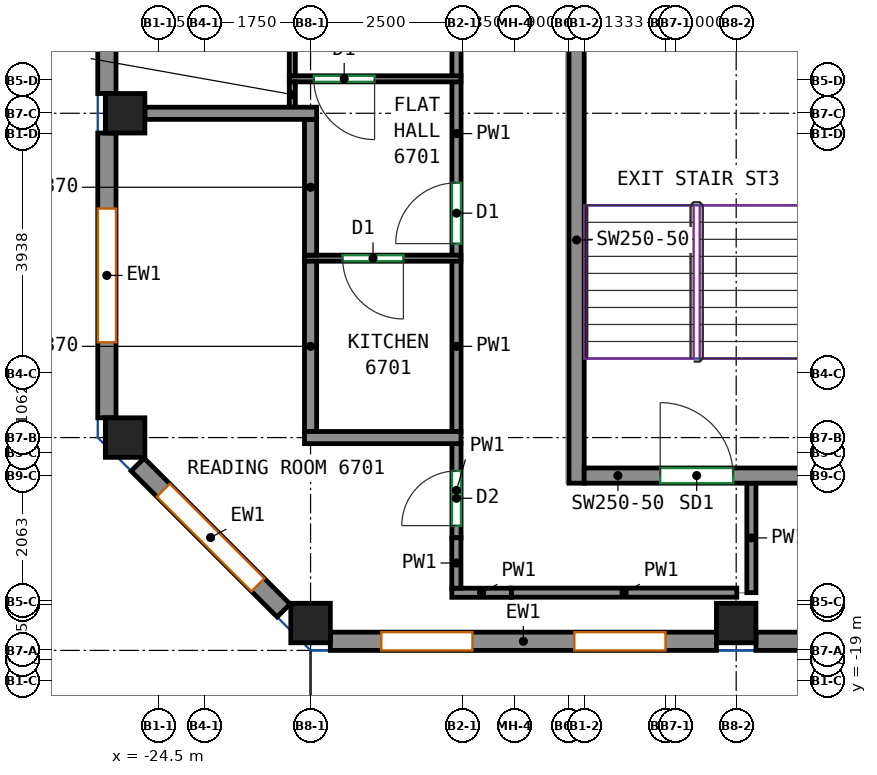
"""IFC4 building model, lengths in metres.
Left out: names, types, materials, properties, quantities, classifications, styles, units other than length and angle.
Written with IfcOpenShell. Run it as: python <this file> out.ifc"""

import sys

from ifc_helpers import new_model, si_unit, direction, frame, frame_2d, origin, origin_2d, place, context, subcontext, project, spatial, rectangle, extrude, source, transform, mapped, element, fill, save


model = new_model("IFC4")
c1 = context("Model", 3, precision=1e-05, world=origin(), true_north=direction((0.0, 1.0)))
c2 = subcontext(c1, "Body", "Model", "MODEL_VIEW")
j1 = project(units=[si_unit("LENGTHUNIT", "METRE"), si_unit("PLANEANGLEUNIT", "RADIAN")], contexts=[c1])
p1 = place(None, origin())
s1 = spatial("IfcSite", under=j1, at=p1, CompositionType="ELEMENT")
p2 = place(p1, origin())
s2 = spatial("IfcBuilding", under=s1, at=p2, CompositionType="ELEMENT")
p3 = place(p2, frame((0.0, 0.0, 273.8)))
s3 = spatial("IfcBuildingStorey", under=s2, at=p3, CompositionType="ELEMENT", Elevation=273.8)
m1 = source(origin(), c2, "Body", "SweptSolid", [
    extrude(rectangle(XDim=0.65, YDim=0.65, at=origin_2d()), origin(), (0.0, 0.0, 1.0), 3.12),
])
for number, where, z_axis, x_axis in (
    (1, (-25.05, -15.0, 0.0), (0.0, 0.0, 1.0), (1.0, 0.0, 0.0)),
    (2, (-25.05, -9.667, 0.0), (0.0, 0.0, 1.0), (1.0, 0.0, 0.0)),
    (3, (-22.0, -18.05, 0.0), (0.0, 0.0, 1.0), (1.0, 0.0, 0.0)),
    (4, (-15.0, -18.05, 0.0), (0.0, 0.0, 1.0), (1.0, 0.0, 0.0)),
):
    element("IfcColumn", number, at=place(p3, frame(where, z_axis=z_axis, x_axis=x_axis)), inside=s3, PredefinedType="COLUMN", context=c2, shape_type="MappedRepresentation", body=[
        mapped(m1, transform((0.0, 0.0, 0.0))),
    ])
m2 = source(origin(), c2, "Body", "SweptSolid", [
    extrude(rectangle(XDim=8.0, YDim=0.25, at=frame_2d((4.0, 0.0))), origin(), (0.0, 0.0, 1.0), 3.12),
])
p4 = place(p3, frame((-17.625, -15.75, 0.0), z_axis=(0.0, 0.0, 1.0), x_axis=(0.0, 1.0, 0.0)))
e5 = element("IfcWall", 5, at=p4, inside=s3, PredefinedType="SHEAR", context=c2, shape_type="MappedRepresentation", body=[
    mapped(m2, transform((0.0, 0.0, 0.0))),
])
m3 = source(origin(), c2, "Body", "SweptSolid", [
    extrude(rectangle(XDim=3.7, YDim=0.25, at=frame_2d((1.85, 0.0))), origin(), (0.0, 0.0, 1.0), 3.12),
])
p5 = place(p3, frame((-17.5, -15.625, 0.0), z_axis=(0.0, 0.0, 1.0), x_axis=(1.0, 0.0, 0.0)))
e6 = element("IfcWall", 6, at=p5, inside=s3, PredefinedType="SHEAR", context=c2, shape_type="MappedRepresentation", body=[
    mapped(m3, transform((0.0, 0.0, 0.0))),
])
p6 = place(p5, frame((1.25, 0.0, 0.0)))
e7 = element("IfcOpeningElement", 7, at=p6, cuts=e6, PredefinedType="OPENING", context=c2, shape_type="SweptSolid", body=[
    extrude(rectangle(XDim=1.2, YDim=2.1, at=frame_2d((0.6, 1.05))), frame((0.0, 0.135, 0.0), z_axis=(0.0, -1.0, 0.0), x_axis=(1.0, 0.0, 0.0)), (0.0, 0.0, 1.0), 0.27),
])
m4 = source(origin(), c2, "Body", "SweptSolid", [
    extrude(rectangle(XDim=6.35, YDim=0.3, at=frame_2d((3.175, 0.0))), origin(), (0.0, 0.0, 1.0), 3.12),
])
p7 = place(p3, frame((-21.675, -18.35, 0.0), z_axis=(0.0, 0.0, 1.0), x_axis=(1.0, 0.0, 0.0)))
e8 = element("IfcWall", 8, at=p7, inside=s3, PredefinedType="SOLIDWALL", context=c2, shape_type="MappedRepresentation", body=[
    mapped(m4, transform((0.0, 0.0, 0.0))),
])
p8 = place(p7, frame((0.837, 0.0, 0.8)))
e9 = element("IfcOpeningElement", 9, at=p8, cuts=e8, PredefinedType="OPENING", context=c2, shape_type="SweptSolid", body=[
    extrude(rectangle(XDim=1.5, YDim=2.05, at=frame_2d((0.75, 1.025))), frame((0.0, 0.16, 0.0), z_axis=(0.0, -1.0, 0.0), x_axis=(1.0, 0.0, 0.0)), (0.0, 0.0, 1.0), 0.32),
])
p9 = place(p7, frame((4.012, 0.0, 0.8)))
e10 = element("IfcOpeningElement", 10, at=p9, cuts=e8, PredefinedType="OPENING", context=c2, shape_type="SweptSolid", body=[
    extrude(rectangle(XDim=1.5, YDim=2.05, at=frame_2d((0.75, 1.025))), frame((0.0, 0.16, 0.0), z_axis=(0.0, -1.0, 0.0), x_axis=(1.0, 0.0, 0.0)), (0.0, 0.0, 1.0), 0.32),
])
p10 = place(p3, frame((-14.675, -18.35, 0.0), z_axis=(0.0, 0.0, 1.0), x_axis=(1.0, 0.0, 0.0)))
e11 = element("IfcWall", 11, at=p10, inside=s3, PredefinedType="SOLIDWALL", context=c2, shape_type="MappedRepresentation", body=[
    mapped(m4, transform((0.0, 0.0, 0.0))),
])
p11 = place(p10, frame((0.837, 0.0, 0.8)))
e12 = element("IfcOpeningElement", 12, at=p11, cuts=e11, PredefinedType="OPENING", context=c2, shape_type="SweptSolid", body=[
    extrude(rectangle(XDim=1.5, YDim=2.05, at=frame_2d((0.75, 1.025))), frame((0.0, 0.16, 0.0), z_axis=(0.0, -1.0, 0.0), x_axis=(1.0, 0.0, 0.0)), (0.0, 0.0, 1.0), 0.32),
])
p12 = place(p10, frame((4.012, 0.0, 0.8)))
e13 = element("IfcOpeningElement", 13, at=p12, cuts=e11, PredefinedType="OPENING", context=c2, shape_type="SweptSolid", body=[
    extrude(rectangle(XDim=1.5, YDim=2.05, at=frame_2d((0.75, 1.025))), frame((0.0, 0.16, 0.0), z_axis=(0.0, -1.0, 0.0), x_axis=(1.0, 0.0, 0.0)), (0.0, 0.0, 1.0), 0.32),
])
m5 = source(origin(), c2, "Body", "SweptSolid", [
    extrude(rectangle(XDim=8.184, YDim=0.3, at=frame_2d((4.092, 0.0))), origin(), (0.0, 0.0, 1.0), 3.12),
])
p13 = place(p3, frame((-25.35, -1.158, 0.0), z_axis=(0.0, 0.0, 1.0), x_axis=(0.0, -1.0, 0.0)))
e14 = element("IfcWall", 14, at=p13, inside=s3, PredefinedType="SOLIDWALL", context=c2, shape_type="MappedRepresentation", body=[
    mapped(m5, transform((0.0, 0.0, 0.0))),
])
p14 = place(p13, frame((0.946, 0.0, 0.8)))
e15 = element("IfcOpeningElement", 15, at=p14, cuts=e14, PredefinedType="OPENING", context=c2, shape_type="SweptSolid", body=[
    extrude(rectangle(XDim=2.2, YDim=2.05, at=frame_2d((1.1, 1.025))), frame((0.0, 0.16, 0.0), z_axis=(0.0, -1.0, 0.0), x_axis=(1.0, 0.0, 0.0)), (0.0, 0.0, 1.0), 0.32),
])
p15 = place(p13, frame((5.038, 0.0, 0.8)))
e16 = element("IfcOpeningElement", 16, at=p15, cuts=e14, PredefinedType="OPENING", context=c2, shape_type="SweptSolid", body=[
    extrude(rectangle(XDim=2.2, YDim=2.05, at=frame_2d((1.1, 1.025))), frame((0.0, 0.16, 0.0), z_axis=(0.0, -1.0, 0.0), x_axis=(1.0, 0.0, 0.0)), (0.0, 0.0, 1.0), 0.32),
])
m6 = source(origin(), c2, "Body", "SweptSolid", [
    extrude(rectangle(XDim=4.683, YDim=0.3, at=frame_2d((2.342, 0.0))), origin(), (0.0, 0.0, 1.0), 3.12),
])
p16 = place(p3, frame((-25.35, -9.992, 0.0), z_axis=(0.0, 0.0, 1.0), x_axis=(0.0, -1.0, 0.0)))
e17 = element("IfcWall", 17, at=p16, inside=s3, PredefinedType="SOLIDWALL", context=c2, shape_type="MappedRepresentation", body=[
    mapped(m6, transform((0.0, 0.0, 0.0))),
])
p17 = place(p16, frame((1.242, 0.0, 0.8)))
e18 = element("IfcOpeningElement", 18, at=p17, cuts=e17, PredefinedType="OPENING", context=c2, shape_type="SweptSolid", body=[
    extrude(rectangle(XDim=2.2, YDim=2.05, at=frame_2d((1.1, 1.025))), frame((0.0, 0.16, 0.0), z_axis=(0.0, -1.0, 0.0), x_axis=(1.0, 0.0, 0.0)), (0.0, 0.0, 1.0), 0.32),
])
m7 = source(origin(), c2, "Body", "SweptSolid", [
    extrude(rectangle(XDim=3.394, YDim=0.3, at=frame_2d((1.697, 0.0))), origin(), (0.0, 0.0, 1.0), 3.12),
])
p18 = place(p3, frame((-24.844, -15.444, 0.0), z_axis=(0.0, 0.0, 1.0), x_axis=(0.707070815327, -0.707142745217, 0.0)))
e19 = element("IfcWall", 19, at=p18, inside=s3, PredefinedType="SOLIDWALL", context=c2, shape_type="MappedRepresentation", body=[
    mapped(m7, transform((0.0, 0.0, 0.0))),
])
p19 = place(p18, frame((0.597, 0.0, 0.8)))
e20 = element("IfcOpeningElement", 20, at=p19, cuts=e19, PredefinedType="OPENING", context=c2, shape_type="SweptSolid", body=[
    extrude(rectangle(XDim=2.2, YDim=2.05, at=frame_2d((1.1, 1.025))), frame((0.0, 0.16, 0.0), z_axis=(0.0, -1.0, 0.0), x_axis=(1.0, 0.0, 0.0)), (0.0, 0.0, 1.0), 0.32),
])
p20 = place(p3, frame((-19.6, -14.91, 0.0), z_axis=(0.0, 0.0, 1.0), x_axis=(0.0, 1.0, 0.0)))
e21 = element("IfcWall", 21, at=p20, inside=s3, PredefinedType="PARTITIONING", context=c2, shape_type="SweptSolid", body=[
    extrude(rectangle(XDim=2.82, YDim=0.15, at=frame_2d((1.41, 0.0))), origin(), (0.0, 0.0, 1.0), 3.12),
])
p21 = place(p3, frame((-19.6, -12.01, 0.0), z_axis=(0.0, 0.0, 1.0), x_axis=(0.0, 1.0, 0.0)))
e22 = element("IfcWall", 22, at=p21, inside=s3, PredefinedType="PARTITIONING", context=c2, shape_type="SweptSolid", body=[
    extrude(rectangle(XDim=2.87, YDim=0.15, at=frame_2d((1.435, 0.0))), origin(), (0.0, 0.0, 1.0), 3.12),
])
p22 = place(p21, frame((0.2, 0.0, 0.0)))
e23 = element("IfcOpeningElement", 23, at=p22, cuts=e22, PredefinedType="OPENING", context=c2, shape_type="SweptSolid", body=[
    extrude(rectangle(XDim=1.0, YDim=2.1, at=frame_2d((0.5, 1.05))), frame((0.0, 0.085, 0.0), z_axis=(0.0, -1.0, 0.0), x_axis=(1.0, 0.0, 0.0)), (0.0, 0.0, 1.0), 0.17),
])
p23 = place(p3, frame((-19.6, -9.06, 0.0), z_axis=(0.0, 0.0, 1.0), x_axis=(0.0, 1.0, 0.0)))
e24 = element("IfcWall", 24, at=p23, inside=s3, PredefinedType="PARTITIONING", context=c2, shape_type="SweptSolid", body=[
    extrude(rectangle(XDim=1.608, YDim=0.15, at=frame_2d((0.804, 0.0))), origin(), (0.0, 0.0, 1.0), 3.12),
])
p24 = place(p3, frame((-14.75, -17.55, 0.0), z_axis=(0.0, 0.0, 1.0), x_axis=(0.0, 1.0, 0.0)))
e25 = element("IfcWall", 25, at=p24, inside=s3, PredefinedType="PARTITIONING", context=c2, shape_type="SweptSolid", body=[
    extrude(rectangle(XDim=1.8, YDim=0.15, at=frame_2d((0.9, 0.0))), origin(), (0.0, 0.0, 1.0), 3.12),
])
p25 = place(p3, frame((-19.6, -16.648, 0.0), z_axis=(0.0, 0.0, 1.0), x_axis=(0.0, 1.0, 0.0)))
e26 = element("IfcWall", 26, at=p25, inside=s3, PredefinedType="PARTITIONING", context=c2, shape_type="SweptSolid", body=[
    extrude(rectangle(XDim=1.558, YDim=0.15, at=frame_2d((0.779, 0.0))), origin(), (0.0, 0.0, 1.0), 3.12),
])
p26 = place(p25, frame((0.2, 0.0, 0.0)))
e27 = element("IfcOpeningElement", 27, at=p26, cuts=e26, PredefinedType="OPENING", context=c2, shape_type="SweptSolid", body=[
    extrude(rectangle(XDim=0.9, YDim=2.1, at=frame_2d((0.45, 1.05))), frame((0.0, 0.085, 0.0), z_axis=(0.0, -1.0, 0.0), x_axis=(1.0, 0.0, 0.0)), (0.0, 0.0, 1.0), 0.17),
])
p27 = place(p3, frame((-18.698, -17.55, 0.0), z_axis=(0.0, 0.0, 1.0), x_axis=(1.0, 0.0, 0.0)))
e28 = element("IfcWall", 28, at=p27, inside=s3, PredefinedType="PARTITIONING", context=c2, shape_type="SweptSolid", body=[
    extrude(rectangle(XDim=3.708, YDim=0.15, at=frame_2d((1.854, 0.0))), origin(), (0.0, 0.0, 1.0), 3.12),
])
p28 = place(p3, frame((-19.677, -17.552, 0.0), z_axis=(0.0, 0.0, 1.0), x_axis=(1.0, 0.0, 0.0)))
e29 = element("IfcWall", 29, at=p28, inside=s3, PredefinedType="PARTITIONING", context=c2, shape_type="SweptSolid", body=[
    extrude(rectangle(XDim=0.979, YDim=0.15, at=frame_2d((0.49, 0.0))), origin(), (0.0, 0.0, 1.0), 3.12),
])
p29 = place(p3, frame((-19.602, -17.477, 0.0), z_axis=(0.0, 0.0, 1.0), x_axis=(0.0, 1.0, 0.0)))
e30 = element("IfcWall", 30, at=p29, inside=s3, PredefinedType="PARTITIONING", context=c2, shape_type="SweptSolid", body=[
    extrude(rectangle(XDim=0.829, YDim=0.15, at=frame_2d((0.415, 0.0))), origin(), (0.0, 0.0, 1.0), 3.12),
])
p30 = place(p3, frame((-19.527, -12.05, 0.0), z_axis=(0.0, 0.0, 1.0), x_axis=(-1.0, 0.0, 0.0)))
e31 = element("IfcWall", 31, at=p30, inside=s3, PredefinedType="PARTITIONING", context=c2, shape_type="SweptSolid", body=[
    extrude(rectangle(XDim=2.573, YDim=0.1, at=frame_2d((1.287, 0.0))), origin(), (0.0, 0.0, 1.0), 3.12),
])
p31 = place(p30, frame((0.946, 0.0, 0.0)))
e32 = element("IfcOpeningElement", 32, at=p31, cuts=e31, PredefinedType="OPENING", context=c2, shape_type="SweptSolid", body=[
    extrude(rectangle(XDim=1.0, YDim=2.1, at=frame_2d((0.5, 1.05))), frame((0.0, 0.06, 0.0), z_axis=(0.0, -1.0, 0.0), x_axis=(1.0, 0.0, 0.0)), (0.0, 0.0, 1.0), 0.12),
])
p32 = place(p3, frame((-22.0, -14.9, 0.0), z_axis=(0.0, 0.0, 1.0), x_axis=(0.0, 1.0, 0.0)))
e33 = element("IfcWall", 33, at=p32, inside=s3, PredefinedType="PARTITIONING", context=c2, shape_type="SweptSolid", body=[
    extrude(rectangle(XDim=2.8, YDim=0.2, at=frame_2d((1.4, 0.0))), origin(), (0.0, 0.0, 1.0), 2.57),
])
p33 = place(p3, frame((-22.1, -15.0, 0.0), z_axis=(0.0, 0.0, 1.0), x_axis=(1.0, 0.0, 0.0)))
e34 = element("IfcWall", 34, at=p33, inside=s3, PredefinedType="PARTITIONING", context=c2, shape_type="SweptSolid", body=[
    extrude(rectangle(XDim=2.573, YDim=0.2, at=frame_2d((1.287, 0.0))), origin(), (0.0, 0.0, 1.0), 3.12),
])
p34 = place(p3, frame((-19.527, -9.1, 0.0), z_axis=(0.0, 0.0, 1.0), x_axis=(-1.0, 0.0, 0.0)))
e35 = element("IfcWall", 35, at=p34, inside=s3, PredefinedType="PARTITIONING", context=c2, shape_type="SweptSolid", body=[
    extrude(rectangle(XDim=2.823, YDim=0.1, at=frame_2d((1.412, 0.0))), origin(), (0.0, 0.0, 1.0), 3.12),
])
p35 = place(p34, frame((1.42, 0.0, 0.0)))
e36 = element("IfcOpeningElement", 36, at=p35, cuts=e35, PredefinedType="OPENING", context=c2, shape_type="SweptSolid", body=[
    extrude(rectangle(XDim=1.0, YDim=2.1, at=frame_2d((0.5, 1.05))), frame((0.0, 0.06, 0.0), z_axis=(0.0, -1.0, 0.0), x_axis=(1.0, 0.0, 0.0)), (0.0, 0.0, 1.0), 0.12),
])
p36 = place(p3, frame((-22.3, -9.567, 0.0), z_axis=(0.0, 0.0, 1.0), x_axis=(0.0, 1.0, 0.0)))
e37 = element("IfcWall", 37, at=p36, inside=s3, PredefinedType="PARTITIONING", context=c2, shape_type="SweptSolid", body=[
    extrude(rectangle(XDim=0.417, YDim=0.1, at=frame_2d((0.208, 0.0))), origin(), (0.0, 0.0, 1.0), 2.57),
])
p37 = place(p3, frame((-22.0, -12.0, 0.0), z_axis=(0.0, 0.0, 1.0), x_axis=(0.0, 1.0, 0.0)))
e38 = element("IfcWall", 38, at=p37, inside=s3, PredefinedType="PARTITIONING", context=c2, shape_type="SweptSolid", body=[
    extrude(rectangle(XDim=2.233, YDim=0.2, at=frame_2d((1.116, 0.0))), origin(), (0.0, 0.0, 1.0), 2.57),
])
p38 = place(p3, frame((-22.3, -9.05, 0.0), z_axis=(0.0, 0.0, 1.0), x_axis=(0.0, 1.0, 0.0)))
e39 = element("IfcWall", 39, at=p38, inside=s3, PredefinedType="PARTITIONING", context=c2, shape_type="SweptSolid", body=[
    extrude(rectangle(XDim=2.85, YDim=0.1, at=frame_2d((1.425, 0.0))), origin(), (0.0, 0.0, 1.0), 2.57),
])
p39 = place(p3, frame((-24.725, -9.667, 0.0), z_axis=(0.0, 0.0, 1.0), x_axis=(1.0, 0.0, 0.0)))
e40 = element("IfcWall", 40, at=p39, inside=s3, PredefinedType="PARTITIONING", context=c2, shape_type="SweptSolid", body=[
    extrude(rectangle(XDim=2.825, YDim=0.2, at=frame_2d((1.413, 0.0))), origin(), (0.0, 0.0, 1.0), 3.12),
])
p40 = place(p8, origin())
e41 = element("IfcWindow", 41, at=p40, inside=s3, PartitioningType="SINGLE_PANEL", PredefinedType="WINDOW", context=c2, shape_type="SweptSolid", body=[
    extrude(rectangle(XDim=1.5, YDim=2.05, at=frame_2d((0.75, 1.025))), frame((0.0, 0.03, 0.0), z_axis=(0.0, -1.0, 0.0), x_axis=(1.0, 0.0, 0.0)), (0.0, 0.0, 1.0), 0.06),
])
fill(e9, e41)
p41 = place(p9, origin())
e42 = element("IfcWindow", 42, at=p41, inside=s3, PartitioningType="SINGLE_PANEL", PredefinedType="WINDOW", context=c2, shape_type="SweptSolid", body=[
    extrude(rectangle(XDim=1.5, YDim=2.05, at=frame_2d((0.75, 1.025))), frame((0.0, 0.03, 0.0), z_axis=(0.0, -1.0, 0.0), x_axis=(1.0, 0.0, 0.0)), (0.0, 0.0, 1.0), 0.06),
])
fill(e10, e42)
p42 = place(p17, origin())
e43 = element("IfcWindow", 43, at=p42, inside=s3, PartitioningType="SINGLE_PANEL", PredefinedType="WINDOW", context=c2, shape_type="SweptSolid", body=[
    extrude(rectangle(XDim=2.2, YDim=2.05, at=frame_2d((1.1, 1.025))), frame((0.0, 0.03, 0.0), z_axis=(0.0, -1.0, 0.0), x_axis=(1.0, 0.0, 0.0)), (0.0, 0.0, 1.0), 0.06),
])
fill(e18, e43)
p43 = place(p19, origin())
e44 = element("IfcWindow", 44, at=p43, inside=s3, PartitioningType="SINGLE_PANEL", PredefinedType="WINDOW", context=c2, shape_type="SweptSolid", body=[
    extrude(rectangle(XDim=2.2, YDim=2.05, at=frame_2d((1.1, 1.025))), frame((0.0, 0.03, 0.0), z_axis=(0.0, -1.0, 0.0), x_axis=(1.0, 0.0, 0.0)), (0.0, 0.0, 1.0), 0.06),
])
fill(e20, e44)
p44 = place(p6, origin())
e45 = element("IfcDoor", 45, at=p44, inside=s3, OperationType="DOUBLE_DOOR_SINGLE_SWING", PredefinedType="DOOR", context=c2, shape_type="SweptSolid", body=[
    extrude(rectangle(XDim=1.2, YDim=2.1, at=frame_2d((0.6, 1.05))), frame((0.0, 0.025, 0.0), z_axis=(0.0, -1.0, 0.0), x_axis=(1.0, 0.0, 0.0)), (0.0, 0.0, 1.0), 0.05),
])
fill(e7, e45)
p45 = place(p26, origin())
e46 = element("IfcDoor", 46, at=p45, inside=s3, OperationType="SINGLE_SWING_LEFT", PredefinedType="DOOR", context=c2, shape_type="SweptSolid", body=[
    extrude(rectangle(XDim=0.9, YDim=2.1, at=frame_2d((0.45, 1.05))), frame((0.0, 0.025, 0.0), z_axis=(0.0, -1.0, 0.0), x_axis=(1.0, 0.0, 0.0)), (0.0, 0.0, 1.0), 0.05),
])
fill(e27, e46)
p46 = place(p31, origin())
e47 = element("IfcDoor", 47, at=p46, inside=s3, OperationType="SINGLE_SWING_LEFT", PredefinedType="DOOR", context=c2, shape_type="SweptSolid", body=[
    extrude(rectangle(XDim=1.0, YDim=2.1, at=frame_2d((0.5, 1.05))), frame((0.0, 0.025, 0.0), z_axis=(0.0, -1.0, 0.0), x_axis=(1.0, 0.0, 0.0)), (0.0, 0.0, 1.0), 0.05),
])
fill(e32, e47)
p47 = place(p22, origin())
e48 = element("IfcDoor", 48, at=p47, inside=s3, OperationType="SINGLE_SWING_LEFT", PredefinedType="DOOR", context=c2, shape_type="SweptSolid", body=[
    extrude(rectangle(XDim=1.0, YDim=2.1, at=frame_2d((0.5, 1.05))), frame((0.0, 0.025, 0.0), z_axis=(0.0, -1.0, 0.0), x_axis=(1.0, 0.0, 0.0)), (0.0, 0.0, 1.0), 0.05),
])
fill(e23, e48)
p48 = place(p35, origin())
e49 = element("IfcDoor", 49, at=p48, inside=s3, OperationType="SINGLE_SWING_LEFT", PredefinedType="DOOR", context=c2, shape_type="SweptSolid", body=[
    extrude(rectangle(XDim=1.0, YDim=2.1, at=frame_2d((0.5, 1.05))), frame((0.0, 0.025, 0.0), z_axis=(0.0, -1.0, 0.0), x_axis=(1.0, 0.0, 0.0)), (0.0, 0.0, 1.0), 0.05),
])
fill(e36, e49)
save(model, sys.argv[1])
